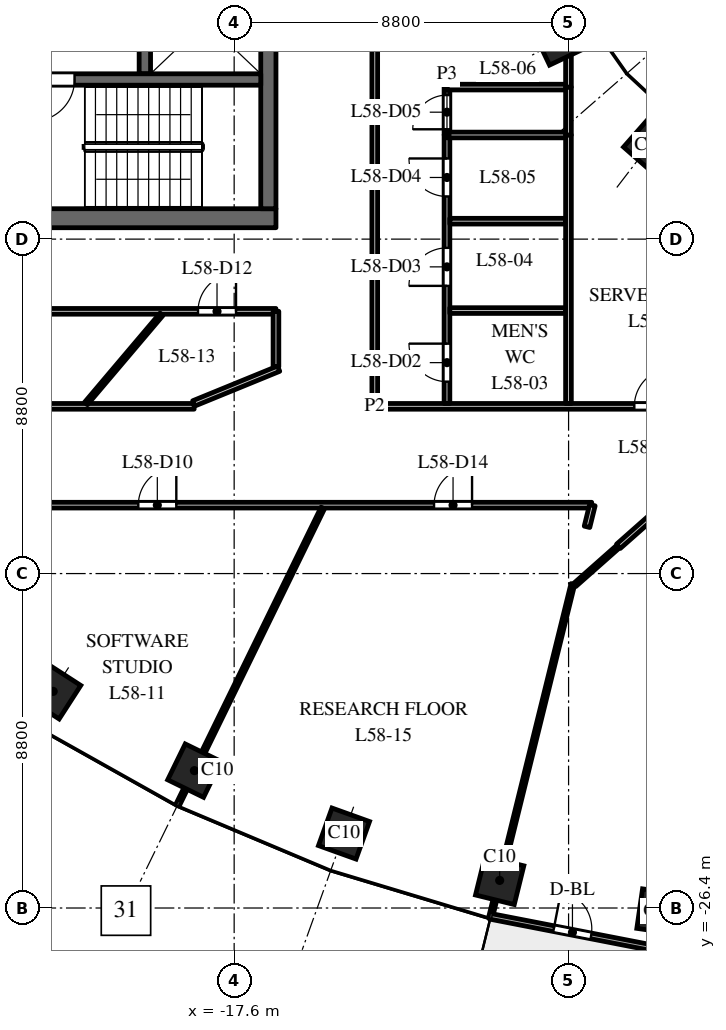
"""IFC4 building model, lengths in metres.
Left out: names, types, materials, properties, quantities, classifications, styles, units other than length and angle.
Written with IfcOpenShell. Run it as: python <this file> out.ifc"""

import sys

from ifc_helpers import new_model, si_unit, direction, frame, frame_2d, origin, origin_2d, place, context, subcontext, project, spatial, rectangle, extrude, element, fill, save


model = new_model("IFC4")
c1 = context("Model", 3, precision=1e-05, world=origin(), true_north=direction((0.0, 1.0)))
c2 = subcontext(c1, "Body", "Model", "MODEL_VIEW")
j1 = project(units=[si_unit("LENGTHUNIT", "METRE"), si_unit("PLANEANGLEUNIT", "RADIAN")], contexts=[c1])
p1 = place(None, origin())
s1 = spatial("IfcSite", under=j1, at=p1, CompositionType="ELEMENT")
p2 = place(p1, origin())
s2 = spatial("IfcBuilding", under=s1, at=p2, CompositionType="ELEMENT")
p3 = place(p2, frame((0.0, 0.0, 273.5)))
s3 = spatial("IfcBuildingStorey", under=s2, at=p3, CompositionType="ELEMENT", Elevation=273.5)
for number, where, z_axis, x_axis in (
    (1, (-22.362, -20.7, 0.0), (0.0, 0.0, 1.0), (0.84, -0.542, 0.0)),
    (2, (-18.646, -22.785, 0.0), (0.0, 0.0, 1.0), (0.898, -0.439, 0.0)),
    (3, (-14.709, -24.441, 0.0), (0.0, 0.0, 1.0), (0.941, -0.338, 0.0)),
    (4, (-10.613, -25.674, 0.0), (0.0, 0.0, 1.0), (0.971, -0.24, 0.0)),
    (5, (-6.409, -26.491, 0.0), (0.0, 0.0, 1.0), (0.99, -0.143, 0.0)),
):
    element("IfcColumn", number, at=place(p3, frame(where, z_axis=z_axis, x_axis=x_axis)), inside=s3, PredefinedType="COLUMN", context=c2, shape_type="SweptSolid", body=[
        extrude(rectangle(XDim=1.05, YDim=1.05, at=origin_2d()), origin(), (0.0, 0.0, 1.0), 4.0),
    ])
for number, where, z_axis, x_axis in (
    (6, (-9.076, -3.588, 0.0), (0.0, 0.0, 1.0), (0.429, -0.903, 0.0)),
    (7, (-6.682, -6.334, 0.0), (0.0, 0.0, 1.0), (0.751, -0.66, 0.0)),
):
    element("IfcColumn", number, at=place(p3, frame(where, z_axis=z_axis, x_axis=x_axis)), inside=s3, PredefinedType="COLUMN", context=c2, shape_type="SweptSolid", body=[
        extrude(rectangle(XDim=0.95, YDim=0.95, at=origin_2d()), origin(), (0.0, 0.0, 1.0), 4.0),
    ])
p4 = place(p3, frame((-16.5, -8.25, 0.0), z_axis=(0.0, 0.0, 1.0), x_axis=(-1.0, 0.0, 0.0)))
e8 = element("IfcWall", 8, at=p4, inside=s3, PredefinedType="SHEAR", context=c2, shape_type="SweptSolid", body=[
    extrude(rectangle(XDim=15.0, YDim=0.5, at=frame_2d((7.5, 0.0))), origin(), (0.0, 0.0, 1.0), 3.7),
])
p5 = place(p4, frame((6.9, 0.0, 0.0)))
e9 = element("IfcOpeningElement", 9, at=p5, cuts=e8, PredefinedType="OPENING", context=c2, shape_type="SweptSolid", body=[
    extrude(rectangle(XDim=1.2, YDim=2.1, at=frame_2d((0.6, 1.05))), frame((0.0, 0.26, 0.0), z_axis=(0.0, -1.0, 0.0), x_axis=(1.0, 0.0, 0.0)), (0.0, 0.0, 1.0), 0.52),
])
p6 = place(p4, frame((12.275, 0.0, 0.0)))
e10 = element("IfcOpeningElement", 10, at=p6, cuts=e8, PredefinedType="OPENING", context=c2, shape_type="SweptSolid", body=[
    extrude(rectangle(XDim=0.9, YDim=2.1, at=frame_2d((0.45, 1.05))), frame((0.0, 0.26, 0.0), z_axis=(0.0, -1.0, 0.0), x_axis=(1.0, 0.0, 0.0)), (0.0, 0.0, 1.0), 0.52),
])
p7 = place(p3, frame((-19.95, -4.45, 0.0), z_axis=(0.0, 0.0, 1.0), x_axis=(0.0, 1.0, 0.0)))
e11 = element("IfcWall", 11, at=p7, inside=s3, PredefinedType="SHEAR", context=c2, shape_type="SweptSolid", body=[
    extrude(rectangle(XDim=8.9, YDim=0.3, at=frame_2d((4.45, 0.0))), origin(), (0.0, 0.0, 1.0), 3.7),
])
p8 = place(p7, frame((0.775, 0.0, 0.0)))
e12 = element("IfcOpeningElement", 12, at=p8, cuts=e11, PredefinedType="OPENING", context=c2, shape_type="SweptSolid", body=[
    extrude(rectangle(XDim=1.2, YDim=2.1, at=frame_2d((0.6, 1.05))), frame((0.0, 0.16, 0.0), z_axis=(0.0, -1.0, 0.0), x_axis=(1.0, 0.0, 0.0)), (0.0, 0.0, 1.0), 0.32),
])
p9 = place(p7, frame((7.25, 0.0, 0.0)))
e13 = element("IfcOpeningElement", 13, at=p9, cuts=e11, PredefinedType="OPENING", context=c2, shape_type="SweptSolid", body=[
    extrude(rectangle(XDim=1.1, YDim=2.1, at=frame_2d((0.55, 1.05))), frame((0.0, 0.16, 0.0), z_axis=(0.0, -1.0, 0.0), x_axis=(1.0, 0.0, 0.0)), (0.0, 0.0, 1.0), 0.32),
])
p10 = place(p3, frame((-16.7, -8.0, 0.0), z_axis=(0.0, 0.0, 1.0), x_axis=(0.0, 1.0, 0.0)))
e14 = element("IfcWall", 14, at=p10, inside=s3, PredefinedType="SHEAR", context=c2, shape_type="SweptSolid", body=[
    extrude(rectangle(XDim=16.0, YDim=0.4, at=frame_2d((8.0, 0.0))), origin(), (0.0, 0.0, 1.0), 3.7),
])
p11 = place(p3, frame((-16.9, -4.6, 0.0), z_axis=(0.0, 0.0, 1.0), x_axis=(-1.0, 0.0, 0.0)))
e15 = element("IfcWall", 15, at=p11, inside=s3, PredefinedType="SHEAR", context=c2, shape_type="SweptSolid", body=[
    extrude(rectangle(XDim=6.18, YDim=0.3, at=frame_2d((3.09, 0.0))), origin(), (0.0, 0.0, 1.0), 3.7),
])
p12 = place(p11, frame((4.9, 0.0, 0.0)))
e16 = element("IfcOpeningElement", 16, at=p12, cuts=e15, PredefinedType="OPENING", context=c2, shape_type="SweptSolid", body=[
    extrude(rectangle(XDim=1.1, YDim=2.1, at=frame_2d((0.55, 1.05))), frame((0.0, 0.16, 0.0), z_axis=(0.0, -1.0, 0.0), x_axis=(1.0, 0.0, 0.0)), (0.0, 0.0, 1.0), 0.32),
])
p13 = place(p3, frame((-10.871, -26.617, 0.0), z_axis=(0.0, 0.0, 1.0), x_axis=(0.981631174778, -0.190788460615, 0.0)))
e17 = element("IfcWall", 17, at=p13, inside=s3, PredefinedType="STANDARD", context=c2, shape_type="SweptSolid", body=[
    extrude(rectangle(XDim=4.426, YDim=0.15, at=frame_2d((2.213, 0.0))), origin(), (0.0, 0.0, 1.0), 3.7),
])
p14 = place(p13, frame((1.713, 0.0, 0.0)))
e18 = element("IfcOpeningElement", 18, at=p14, cuts=e17, PredefinedType="OPENING", context=c2, shape_type="SweptSolid", body=[
    extrude(rectangle(XDim=1.0, YDim=2.4, at=frame_2d((0.5, 1.2))), frame((0.0, 0.085, 0.0), z_axis=(0.0, -1.0, 0.0), x_axis=(1.0, 0.0, 0.0)), (0.0, 0.0, 1.0), 0.17),
])
p15 = place(p3, frame((-31.5, -10.7, 0.0), z_axis=(0.0, 0.0, 1.0), x_axis=(1.0, 0.0, 0.0)))
e19 = element("IfcWall", 19, at=p15, inside=s3, PredefinedType="PARTITIONING", context=c2, shape_type="SweptSolid", body=[
    extrude(rectangle(XDim=15.0, YDim=0.15, at=frame_2d((7.5, 0.0))), origin(), (0.0, 0.0, 1.0), 3.1),
])
p16 = place(p15, frame((6.629, 0.0, 0.0)))
e20 = element("IfcOpeningElement", 20, at=p16, cuts=e19, PredefinedType="OPENING", context=c2, shape_type="SweptSolid", body=[
    extrude(rectangle(XDim=1.0, YDim=2.1, at=frame_2d((0.5, 1.05))), frame((0.0, 0.085, 0.0), z_axis=(0.0, -1.0, 0.0), x_axis=(1.0, 0.0, 0.0)), (0.0, 0.0, 1.0), 0.17),
])
p17 = place(p15, frame((12.949, 0.0, 0.0)))
e21 = element("IfcOpeningElement", 21, at=p17, cuts=e19, PredefinedType="OPENING", context=c2, shape_type="SweptSolid", body=[
    extrude(rectangle(XDim=1.0, YDim=2.1, at=frame_2d((0.5, 1.05))), frame((0.0, 0.085, 0.0), z_axis=(0.0, -1.0, 0.0), x_axis=(1.0, 0.0, 0.0)), (0.0, 0.0, 1.0), 0.17),
])
p18 = place(p3, frame((-28.0, -15.8, 0.0), z_axis=(0.0, 0.0, 1.0), x_axis=(1.0, 0.0, 0.0)))
e22 = element("IfcWall", 22, at=p18, inside=s3, PredefinedType="PARTITIONING", context=c2, shape_type="SweptSolid", body=[
    extrude(rectangle(XDim=19.809, YDim=0.15, at=frame_2d((9.905, 0.0))), origin(), (0.0, 0.0, 1.0), 2.75),
])
p19 = place(p18, frame((7.878, 0.0, 0.0)))
e23 = element("IfcOpeningElement", 23, at=p19, cuts=e22, PredefinedType="OPENING", context=c2, shape_type="SweptSolid", body=[
    extrude(rectangle(XDim=1.0, YDim=2.1, at=frame_2d((0.5, 1.05))), frame((0.0, 0.085, 0.0), z_axis=(0.0, -1.0, 0.0), x_axis=(1.0, 0.0, 0.0)), (0.0, 0.0, 1.0), 0.17),
])
p20 = place(p18, frame((15.66, 0.0, 0.0)))
e24 = element("IfcOpeningElement", 24, at=p20, cuts=e22, PredefinedType="OPENING", context=c2, shape_type="SweptSolid", body=[
    extrude(rectangle(XDim=1.0, YDim=2.1, at=frame_2d((0.5, 1.05))), frame((0.0, 0.085, 0.0), z_axis=(0.0, -1.0, 0.0), x_axis=(1.0, 0.0, 0.0)), (0.0, 0.0, 1.0), 0.17),
])
p21 = place(p3, frame((-28.0, -13.2, 0.0), z_axis=(0.0, 0.0, 1.0), x_axis=(1.0, 0.0, 0.0)))
e25 = element("IfcWall", 25, at=p21, inside=s3, PredefinedType="PARTITIONING", context=c2, shape_type="SweptSolid", body=[
    extrude(rectangle(XDim=9.347, YDim=0.15, at=frame_2d((4.673, 0.0))), origin(), (0.0, 0.0, 1.0), 2.75),
])
p22 = place(p3, frame((-21.499, -13.125, 0.0), z_axis=(0.0, 0.0, 1.0), x_axis=(0.646354899778, 0.763036921474, 0.0)))
e26 = element("IfcWall", 26, at=p22, inside=s3, PredefinedType="PARTITIONING", context=c2, shape_type="SweptSolid", body=[
    extrude(rectangle(XDim=3.076, YDim=0.1, at=frame_2d((1.538, 0.0))), origin(), (0.0, 0.0, 1.0), 3.7),
])
p23 = place(p3, frame((-19.086, -23.685, 0.0), z_axis=(0.0, 0.0, 1.0), x_axis=(0.439174872977, 0.898401597809, 0.0)))
e27 = element("IfcWall", 27, at=p23, inside=s3, PredefinedType="PARTITIONING", context=c2, shape_type="SweptSolid", body=[
    extrude(rectangle(XDim=8.693, YDim=0.1, at=frame_2d((4.347, 0.0))), origin(), (0.0, 0.0, 1.0), 2.85),
])
p24 = place(p3, frame((-18.664, -13.123, 0.0), z_axis=(0.0, 0.0, 1.0), x_axis=(0.925590432986, 0.378526551731, 0.0)))
e28 = element("IfcWall", 28, at=p24, inside=s3, PredefinedType="PARTITIONING", context=c2, shape_type="SweptSolid", body=[
    extrude(rectangle(XDim=2.415, YDim=0.15, at=frame_2d((1.208, 0.0))), origin(), (0.0, 0.0, 1.0), 2.75),
])
p25 = place(p3, frame((-16.5, -12.157, 0.0), z_axis=(0.0, 0.0, 1.0), x_axis=(0.0, 1.0, 0.0)))
e29 = element("IfcWall", 29, at=p25, inside=s3, PredefinedType="PARTITIONING", context=c2, shape_type="SweptSolid", body=[
    extrude(rectangle(XDim=1.457, YDim=0.15, at=frame_2d((0.729, 0.0))), origin(), (0.0, 0.0, 1.0), 2.75),
])
p26 = place(p3, frame((-13.9, -13.2, 0.0), z_axis=(0.0, 0.0, 1.0), x_axis=(0.0, 1.0, 0.0)))
e30 = element("IfcWall", 30, at=p26, inside=s3, PredefinedType="PARTITIONING", context=c2, shape_type="SweptSolid", body=[
    extrude(rectangle(XDim=26.4, YDim=0.15, at=frame_2d((13.2, 0.0))), origin(), (0.0, 0.0, 1.0), 2.75),
])
p27 = place(p26, frame((12.65, 0.0, 0.0)))
e31 = element("IfcOpeningElement", 31, at=p27, cuts=e30, PredefinedType="OPENING", context=c2, shape_type="SweptSolid", body=[
    extrude(rectangle(XDim=1.0, YDim=2.1, at=frame_2d((0.5, 1.05))), frame((0.0, 0.085, 0.0), z_axis=(0.0, -1.0, 0.0), x_axis=(1.0, 0.0, 0.0)), (0.0, 0.0, 1.0), 0.17),
])
p28 = place(p3, frame((-13.9, -13.2, 0.0), z_axis=(0.0, 0.0, 1.0), x_axis=(1.0, 0.0, 0.0)))
e32 = element("IfcWall", 32, at=p28, inside=s3, PredefinedType="PARTITIONING", context=c2, shape_type="SweptSolid", body=[
    extrude(rectangle(XDim=27.8, YDim=0.15, at=frame_2d((13.9, 0.0))), origin(), (0.0, 0.0, 1.0), 2.85),
])
p29 = place(p28, frame((6.83, 0.0, 0.0)))
e33 = element("IfcOpeningElement", 33, at=p29, cuts=e32, PredefinedType="OPENING", context=c2, shape_type="SweptSolid", body=[
    extrude(rectangle(XDim=1.0, YDim=2.1, at=frame_2d((0.5, 1.05))), frame((0.0, 0.085, 0.0), z_axis=(0.0, -1.0, 0.0), x_axis=(1.0, 0.0, 0.0)), (0.0, 0.0, 1.0), 0.17),
])
p30 = place(p28, frame((11.463, 0.0, 0.0)))
e34 = element("IfcOpeningElement", 34, at=p30, cuts=e32, PredefinedType="OPENING", context=c2, shape_type="SweptSolid", body=[
    extrude(rectangle(XDim=1.0, YDim=2.1, at=frame_2d((0.5, 1.05))), frame((0.0, 0.085, 0.0), z_axis=(0.0, -1.0, 0.0), x_axis=(1.0, 0.0, 0.0)), (0.0, 0.0, 1.0), 0.17),
])
p31 = place(p28, frame((16.097, 0.0, 0.0)))
e35 = element("IfcOpeningElement", 35, at=p31, cuts=e32, PredefinedType="OPENING", context=c2, shape_type="SweptSolid", body=[
    extrude(rectangle(XDim=1.0, YDim=2.1, at=frame_2d((0.5, 1.05))), frame((0.0, 0.085, 0.0), z_axis=(0.0, -1.0, 0.0), x_axis=(1.0, 0.0, 0.0)), (0.0, 0.0, 1.0), 0.17),
])
p32 = place(p3, frame((-12.0, -13.125, 0.0), z_axis=(0.0, 0.0, 1.0), x_axis=(0.0, 1.0, 0.0)))
e36 = element("IfcWall", 36, at=p32, inside=s3, PredefinedType="PARTITIONING", context=c2, shape_type="SweptSolid", body=[
    extrude(rectangle(XDim=7.065, YDim=0.15, at=frame_2d((3.532, 0.0))), origin(), (0.0, 0.0, 1.0), 2.75),
])
p33 = place(p32, frame((0.575, 0.0, 0.0)))
e37 = element("IfcOpeningElement", 37, at=p33, cuts=e36, PredefinedType="OPENING", context=c2, shape_type="SweptSolid", body=[
    extrude(rectangle(XDim=1.0, YDim=2.1, at=frame_2d((0.5, 1.05))), frame((0.0, 0.085, 0.0), z_axis=(0.0, -1.0, 0.0), x_axis=(1.0, 0.0, 0.0)), (0.0, 0.0, 1.0), 0.17),
])
p34 = place(p32, frame((3.095, 0.0, 0.0)))
e38 = element("IfcOpeningElement", 38, at=p34, cuts=e36, PredefinedType="OPENING", context=c2, shape_type="SweptSolid", body=[
    extrude(rectangle(XDim=1.0, YDim=2.1, at=frame_2d((0.5, 1.05))), frame((0.0, 0.085, 0.0), z_axis=(0.0, -1.0, 0.0), x_axis=(1.0, 0.0, 0.0)), (0.0, 0.0, 1.0), 0.17),
])
p35 = place(p32, frame((5.447, 0.0, 0.0)))
e39 = element("IfcOpeningElement", 39, at=p35, cuts=e36, PredefinedType="OPENING", context=c2, shape_type="SweptSolid", body=[
    extrude(rectangle(XDim=1.0, YDim=2.1, at=frame_2d((0.5, 1.05))), frame((0.0, 0.085, 0.0), z_axis=(0.0, -1.0, 0.0), x_axis=(1.0, 0.0, 0.0)), (0.0, 0.0, 1.0), 0.17),
])
p36 = place(p3, frame((-11.925, -10.68, 0.0), z_axis=(0.0, 0.0, 1.0), x_axis=(1.0, 0.0, 0.0)))
e40 = element("IfcWall", 40, at=p36, inside=s3, PredefinedType="PARTITIONING", context=c2, shape_type="SweptSolid", body=[
    extrude(rectangle(XDim=3.047, YDim=0.15, at=frame_2d((1.523, 0.0))), origin(), (0.0, 0.0, 1.0), 3.7),
])
p37 = place(p3, frame((-11.925, -8.328, 0.0), z_axis=(0.0, 0.0, 1.0), x_axis=(1.0, 0.0, 0.0)))
e41 = element("IfcWall", 41, at=p37, inside=s3, PredefinedType="PARTITIONING", context=c2, shape_type="SweptSolid", body=[
    extrude(rectangle(XDim=3.047, YDim=0.15, at=frame_2d((1.523, 0.0))), origin(), (0.0, 0.0, 1.0), 2.75),
])
p38 = place(p3, frame((-12.0, -6.06, 0.0), z_axis=(0.0, 0.0, 1.0), x_axis=(0.0, 1.0, 0.0)))
e42 = element("IfcWall", 42, at=p38, inside=s3, PredefinedType="PARTITIONING", context=c2, shape_type="SweptSolid", body=[
    extrude(rectangle(XDim=1.26, YDim=0.15, at=frame_2d((0.63, 0.0))), origin(), (0.0, 0.0, 1.0), 3.7),
])
p39 = place(p38, frame((0.15, 0.0, 0.0)))
e43 = element("IfcOpeningElement", 43, at=p39, cuts=e42, PredefinedType="OPENING", context=c2, shape_type="SweptSolid", body=[
    extrude(rectangle(XDim=0.9, YDim=2.1, at=frame_2d((0.45, 1.05))), frame((0.0, 0.085, 0.0), z_axis=(0.0, -1.0, 0.0), x_axis=(1.0, 0.0, 0.0)), (0.0, 0.0, 1.0), 0.17),
])
for number, where, z_axis, x_axis in (
    (44, (-12.0, -6.06, 0.0), (0.0, 0.0, 1.0), (1.0, 0.0, 0.0)),
    (45, (-12.0, -4.8, 0.0), (0.0, 0.0, 1.0), (1.0, 0.0, 0.0)),
):
    element("IfcWall", number, at=place(p3, frame(where, z_axis=z_axis, x_axis=x_axis)), inside=s3, PredefinedType="PARTITIONING", context=c2, shape_type="SweptSolid", body=[
        extrude(rectangle(XDim=3.197, YDim=0.15, at=frame_2d((1.599, 0.0))), origin(), (0.0, 0.0, 1.0), 3.7),
    ])
p40 = place(p3, frame((-10.853, -26.646, 0.0), z_axis=(0.0, 0.0, 1.0), x_axis=(0.239774810524, 0.970828532872, 0.0)))
e46 = element("IfcWall", 46, at=p40, inside=s3, PredefinedType="PARTITIONING", context=c2, shape_type="SweptSolid", body=[
    extrude(rectangle(XDim=9.033, YDim=0.1, at=frame_2d((4.517, 0.0))), origin(), (0.0, 0.0, 1.0), 2.85),
])
p41 = place(p3, frame((-8.803, -13.125, 0.0), z_axis=(0.0, 0.0, 1.0), x_axis=(0.0, 1.0, 0.0)))
e47 = element("IfcWall", 47, at=p41, inside=s3, PredefinedType="PARTITIONING", context=c2, shape_type="SweptSolid", body=[
    extrude(rectangle(XDim=7.065, YDim=0.15, at=frame_2d((3.532, 0.0))), origin(), (0.0, 0.0, 1.0), 2.75),
])
p42 = place(p3, frame((-8.803, -6.06, 0.0), z_axis=(0.0, 0.0, 1.0), x_axis=(0.0, 1.0, 0.0)))
e48 = element("IfcWall", 48, at=p42, inside=s3, PredefinedType="PARTITIONING", context=c2, shape_type="SweptSolid", body=[
    extrude(rectangle(XDim=1.26, YDim=0.15, at=frame_2d((0.63, 0.0))), origin(), (0.0, 0.0, 1.0), 3.7),
])
p43 = place(p3, frame((-8.803, -4.8, 0.0), z_axis=(0.0, 0.0, 1.0), x_axis=(0.0, 1.0, 0.0)))
e49 = element("IfcWall", 49, at=p43, inside=s3, PredefinedType="PARTITIONING", context=c2, shape_type="SweptSolid", body=[
    extrude(rectangle(XDim=3.307, YDim=0.15, at=frame_2d((1.654, 0.0))), origin(), (0.0, 0.0, 1.0), 3.0),
])
p44 = place(p3, frame((-8.642, -17.903, 0.0), z_axis=(0.0, 0.0, 1.0), x_axis=(0.748963294947, 0.662611487089, 0.0)))
e50 = element("IfcWall", 50, at=p44, inside=s3, PredefinedType="PARTITIONING", context=c2, shape_type="SweptSolid", body=[
    extrude(rectangle(XDim=1.541, YDim=0.1, at=frame_2d((0.771, 0.0))), origin(), (0.0, 0.0, 1.0), 3.7),
])
p45 = place(p3, frame((-8.315, -16.37, 0.0), z_axis=(0.0, 0.0, 1.0), x_axis=(0.239893428325, 0.97079922901, 0.0)))
e51 = element("IfcWall", 51, at=p45, inside=s3, PredefinedType="PARTITIONING", context=c2, shape_type="SweptSolid", body=[
    extrude(rectangle(XDim=0.587, YDim=0.15, at=frame_2d((0.293, 0.0))), origin(), (0.0, 0.0, 1.0), 3.7),
])
p46 = place(p3, frame((-7.488, -16.882, 0.0), z_axis=(0.0, 0.0, 1.0), x_axis=(0.749084830903, 0.662474087124, 0.0)))
e52 = element("IfcWall", 52, at=p46, inside=s3, PredefinedType="PARTITIONING", context=c2, shape_type="SweptSolid", body=[
    extrude(rectangle(XDim=1.742, YDim=0.15, at=frame_2d((0.871, 0.0))), origin(), (0.0, 0.0, 1.0), 2.85),
])
p47 = place(p12, origin())
e53 = element("IfcDoor", 53, at=p47, inside=s3, OperationType="SINGLE_SWING_LEFT", PredefinedType="DOOR", context=c2, shape_type="SweptSolid", body=[
    extrude(rectangle(XDim=1.1, YDim=2.1, at=frame_2d((0.55, 1.05))), frame((0.0, 0.025, 0.0), z_axis=(0.0, -1.0, 0.0), x_axis=(1.0, 0.0, 0.0)), (0.0, 0.0, 1.0), 0.05),
])
fill(e16, e53)
p48 = place(p14, origin())
e54 = element("IfcDoor", 54, at=p48, inside=s3, OperationType="SINGLE_SWING_LEFT", PredefinedType="DOOR", context=c2, shape_type="SweptSolid", body=[
    extrude(rectangle(XDim=1.0, YDim=2.4, at=frame_2d((0.5, 1.2))), frame((0.0, 0.025, 0.0), z_axis=(0.0, -1.0, 0.0), x_axis=(1.0, 0.0, 0.0)), (0.0, 0.0, 1.0), 0.05),
])
fill(e18, e54)
p49 = place(p33, origin())
e55 = element("IfcDoor", 55, at=p49, inside=s3, OperationType="SINGLE_SWING_RIGHT", PredefinedType="DOOR", context=c2, shape_type="SweptSolid", body=[
    extrude(rectangle(XDim=1.0, YDim=2.1, at=frame_2d((0.5, 1.05))), frame((0.0, 0.025, 0.0), z_axis=(0.0, -1.0, 0.0), x_axis=(1.0, 0.0, 0.0)), (0.0, 0.0, 1.0), 0.05),
])
fill(e37, e55)
p50 = place(p34, origin())
e56 = element("IfcDoor", 56, at=p50, inside=s3, OperationType="SINGLE_SWING_LEFT", PredefinedType="DOOR", context=c2, shape_type="SweptSolid", body=[
    extrude(rectangle(XDim=1.0, YDim=2.1, at=frame_2d((0.5, 1.05))), frame((0.0, 0.025, 0.0), z_axis=(0.0, -1.0, 0.0), x_axis=(1.0, 0.0, 0.0)), (0.0, 0.0, 1.0), 0.05),
])
fill(e38, e56)
p51 = place(p35, origin())
e57 = element("IfcDoor", 57, at=p51, inside=s3, OperationType="SINGLE_SWING_RIGHT", PredefinedType="DOOR", context=c2, shape_type="SweptSolid", body=[
    extrude(rectangle(XDim=1.0, YDim=2.1, at=frame_2d((0.5, 1.05))), frame((0.0, 0.025, 0.0), z_axis=(0.0, -1.0, 0.0), x_axis=(1.0, 0.0, 0.0)), (0.0, 0.0, 1.0), 0.05),
])
fill(e39, e57)
p52 = place(p39, origin())
e58 = element("IfcDoor", 58, at=p52, inside=s3, OperationType="SINGLE_SWING_LEFT", PredefinedType="DOOR", context=c2, shape_type="SweptSolid", body=[
    extrude(rectangle(XDim=0.9, YDim=2.1, at=frame_2d((0.45, 1.05))), frame((0.0, 0.025, 0.0), z_axis=(0.0, -1.0, 0.0), x_axis=(1.0, 0.0, 0.0)), (0.0, 0.0, 1.0), 0.05),
])
fill(e43, e58)
p53 = place(p19, origin())
e59 = element("IfcDoor", 59, at=p53, inside=s3, OperationType="SINGLE_SWING_RIGHT", PredefinedType="DOOR", context=c2, shape_type="SweptSolid", body=[
    extrude(rectangle(XDim=1.0, YDim=2.1, at=frame_2d((0.5, 1.05))), frame((0.0, 0.025, 0.0), z_axis=(0.0, -1.0, 0.0), x_axis=(1.0, 0.0, 0.0)), (0.0, 0.0, 1.0), 0.05),
])
fill(e23, e59)
p54 = place(p17, origin())
e60 = element("IfcDoor", 60, at=p54, inside=s3, OperationType="SINGLE_SWING_RIGHT", PredefinedType="DOOR", context=c2, shape_type="SweptSolid", body=[
    extrude(rectangle(XDim=1.0, YDim=2.1, at=frame_2d((0.5, 1.05))), frame((0.0, 0.025, 0.0), z_axis=(0.0, -1.0, 0.0), x_axis=(1.0, 0.0, 0.0)), (0.0, 0.0, 1.0), 0.05),
])
fill(e21, e60)
p55 = place(p20, origin())
e61 = element("IfcDoor", 61, at=p55, inside=s3, OperationType="SINGLE_SWING_RIGHT", PredefinedType="DOOR", context=c2, shape_type="SweptSolid", body=[
    extrude(rectangle(XDim=1.0, YDim=2.1, at=frame_2d((0.5, 1.05))), frame((0.0, 0.025, 0.0), z_axis=(0.0, -1.0, 0.0), x_axis=(1.0, 0.0, 0.0)), (0.0, 0.0, 1.0), 0.05),
])
fill(e24, e61)
p56 = place(p29, origin())
e62 = element("IfcDoor", 62, at=p56, inside=s3, OperationType="SINGLE_SWING_RIGHT", PredefinedType="DOOR", context=c2, shape_type="SweptSolid", body=[
    extrude(rectangle(XDim=1.0, YDim=2.1, at=frame_2d((0.5, 1.05))), frame((0.0, 0.025, 0.0), z_axis=(0.0, -1.0, 0.0), x_axis=(1.0, 0.0, 0.0)), (0.0, 0.0, 1.0), 0.05),
])
fill(e33, e62)
save(model, sys.argv[1])
